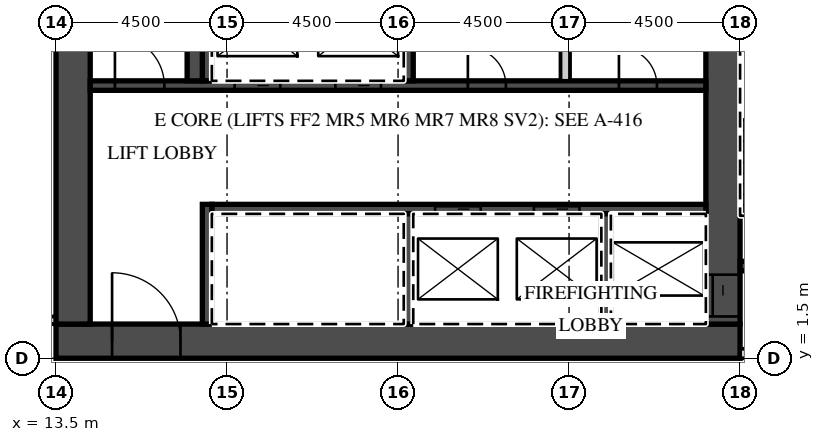
"""IFC4 building model, lengths in metres.
Left out: names, types, materials, properties, quantities, classifications, styles, units other than length and angle.
Written with IfcOpenShell. Run it as: python <this file> out.ifc"""

import sys

from ifc_helpers import new_model, si_unit, direction, frame, frame_2d, origin, place, context, subcontext, project, spatial, rectangle, extrude, element, fill, save


model = new_model("IFC4")
c1 = context("Model", 3, precision=1e-05, world=origin(), true_north=direction((0.0, 1.0)))
c2 = subcontext(c1, "Body", "Model", "MODEL_VIEW")
j1 = project(units=[si_unit("LENGTHUNIT", "METRE"), si_unit("PLANEANGLEUNIT", "RADIAN")], contexts=[c1])
p1 = place(None, origin())
s1 = spatial("IfcSite", under=j1, at=p1, CompositionType="ELEMENT")
p2 = place(p1, origin())
s2 = spatial("IfcBuilding", under=s1, at=p2, CompositionType="ELEMENT")
p3 = place(p2, frame((0.0, 0.0, 221.0)))
s3 = spatial("IfcBuildingStorey", under=s2, at=p3, CompositionType="ELEMENT", Elevation=221.0)
p4 = place(p3, frame((-13.5, 2.5, 0.0), z_axis=(0.0, 0.0, 1.0), x_axis=(1.0, 0.0, 0.0)))
e1 = element("IfcWall", 1, at=p4, inside=s3, PredefinedType="PARTITIONING", context=c2, shape_type="SweptSolid", body=[
    extrude(rectangle(XDim=27.0, YDim=0.2, at=frame_2d((13.5, 0.0))), origin(), (0.0, 0.0, 1.0), 3.02),
])
p5 = place(p4, frame((2.925, 0.0, 0.0)))
e2 = element("IfcOpeningElement", 2, at=p5, cuts=e1, PredefinedType="OPENING", context=c2, shape_type="SweptSolid", body=[
    extrude(rectangle(XDim=1.0, YDim=2.1, at=frame_2d((0.5, 1.05))), frame((0.0, 0.11, 0.0), z_axis=(0.0, -1.0, 0.0), x_axis=(1.0, 0.0, 0.0)), (0.0, 0.0, 1.0), 0.22),
])
p6 = place(p4, frame((7.45, 0.0, 0.0)))
e3 = element("IfcOpeningElement", 3, at=p6, cuts=e1, PredefinedType="OPENING", context=c2, shape_type="SweptSolid", body=[
    extrude(rectangle(XDim=1.0, YDim=2.1, at=frame_2d((0.5, 1.05))), frame((0.0, 0.11, 0.0), z_axis=(0.0, -1.0, 0.0), x_axis=(1.0, 0.0, 0.0)), (0.0, 0.0, 1.0), 0.22),
])
p7 = place(p4, frame((11.925, 0.0, 0.0)))
e4 = element("IfcOpeningElement", 4, at=p7, cuts=e1, PredefinedType="OPENING", context=c2, shape_type="SweptSolid", body=[
    extrude(rectangle(XDim=1.0, YDim=2.1, at=frame_2d((0.5, 1.05))), frame((0.0, 0.11, 0.0), z_axis=(0.0, -1.0, 0.0), x_axis=(1.0, 0.0, 0.0)), (0.0, 0.0, 1.0), 0.22),
])
p8 = place(p4, frame((14.075, 0.0, 0.0)))
e5 = element("IfcOpeningElement", 5, at=p8, cuts=e1, PredefinedType="OPENING", context=c2, shape_type="SweptSolid", body=[
    extrude(rectangle(XDim=1.0, YDim=2.1, at=frame_2d((0.5, 1.05))), frame((0.0, 0.11, 0.0), z_axis=(0.0, -1.0, 0.0), x_axis=(1.0, 0.0, 0.0)), (0.0, 0.0, 1.0), 0.22),
])
p9 = place(p4, frame((20.925, 0.0, 0.0)))
e6 = element("IfcOpeningElement", 6, at=p9, cuts=e1, PredefinedType="OPENING", context=c2, shape_type="SweptSolid", body=[
    extrude(rectangle(XDim=1.0, YDim=2.1, at=frame_2d((0.5, 1.05))), frame((0.0, 0.11, 0.0), z_axis=(0.0, -1.0, 0.0), x_axis=(1.0, 0.0, 0.0)), (0.0, 0.0, 1.0), 0.22),
])
p10 = place(p4, frame((25.425, 0.0, 0.0)))
e7 = element("IfcOpeningElement", 7, at=p10, cuts=e1, PredefinedType="OPENING", context=c2, shape_type="SweptSolid", body=[
    extrude(rectangle(XDim=1.0, YDim=2.1, at=frame_2d((0.5, 1.05))), frame((0.0, 0.11, 0.0), z_axis=(0.0, -1.0, 0.0), x_axis=(1.0, 0.0, 0.0)), (0.0, 0.0, 1.0), 0.22),
])
p11 = place(p3, frame((13.5, 1.95, 0.0), z_axis=(0.0, 0.0, 1.0), x_axis=(1.0, 0.0, 0.0)))
e8 = element("IfcWall", 8, at=p11, inside=s3, PredefinedType="SHEAR", context=c2, shape_type="SweptSolid", body=[
    extrude(rectangle(XDim=18.0, YDim=0.9, at=frame_2d((9.0, 0.0))), origin(), (0.0, 0.0, 1.0), 3.02),
])
p12 = place(p11, frame((1.475, 0.0, 0.0)))
e9 = element("IfcOpeningElement", 9, at=p12, cuts=e8, PredefinedType="OPENING", context=c2, shape_type="SweptSolid", body=[
    extrude(rectangle(XDim=1.8, YDim=2.1, at=frame_2d((0.9, 1.05))), frame((0.0, 0.46, 0.0), z_axis=(0.0, -1.0, 0.0), x_axis=(1.0, 0.0, 0.0)), (0.0, 0.0, 1.0), 0.92),
])
p13 = place(p3, frame((31.05, 2.4, 0.0), z_axis=(0.0, 0.0, 1.0), x_axis=(0.0, 1.0, 0.0)))
e10 = element("IfcWall", 10, at=p13, inside=s3, PredefinedType="SHEAR", context=c2, shape_type="SweptSolid", body=[
    extrude(rectangle(XDim=12.8, YDim=0.9, at=frame_2d((6.4, 0.0))), origin(), (0.0, 0.0, 1.0), 3.02),
])
p14 = place(p13, frame((0.2, 0.0, 0.0)))
e11 = element("IfcOpeningElement", 11, at=p14, cuts=e10, PredefinedType="OPENING", context=c2, shape_type="SweptSolid", body=[
    extrude(rectangle(XDim=1.1, YDim=2.1, at=frame_2d((0.55, 1.05))), frame((0.0, 0.46, 0.0), z_axis=(0.0, -1.0, 0.0), x_axis=(1.0, 0.0, 0.0)), (0.0, 0.0, 1.0), 0.92),
])
p15 = place(p3, frame((13.95, 2.4, 0.0), z_axis=(0.0, 0.0, 1.0), x_axis=(0.0, 1.0, 0.0)))
e12 = element("IfcWall", 12, at=p15, inside=s3, PredefinedType="SHEAR", context=c2, shape_type="SweptSolid", body=[
    extrude(rectangle(XDim=12.2, YDim=0.9, at=frame_2d((6.1, 0.0))), origin(), (0.0, 0.0, 1.0), 3.02),
])
p16 = place(p3, frame((17.6, 5.425, 0.0), z_axis=(0.0, 0.0, 1.0), x_axis=(1.0, 0.0, 0.0)))
e13 = element("IfcWall", 13, at=p16, inside=s3, PredefinedType="SHEAR", context=c2, shape_type="SweptSolid", body=[
    extrude(rectangle(XDim=13.0, YDim=0.25, at=frame_2d((6.5, 0.0))), origin(), (0.0, 0.0, 1.0), 3.02),
])
p17 = place(p16, frame((8.475, 0.0, 0.0)))
e14 = element("IfcOpeningElement", 14, at=p17, cuts=e13, PredefinedType="OPENING", context=c2, shape_type="SweptSolid", body=[
    extrude(rectangle(XDim=1.2, YDim=2.1, at=frame_2d((0.6, 1.05))), frame((0.0, 0.135, 0.0), z_axis=(0.0, -1.0, 0.0), x_axis=(1.0, 0.0, 0.0)), (0.0, 0.0, 1.0), 0.27),
])
p18 = place(p16, frame((5.875, 0.0, 0.0)))
e15 = element("IfcOpeningElement", 15, at=p18, cuts=e13, PredefinedType="OPENING", context=c2, shape_type="SweptSolid", body=[
    extrude(rectangle(XDim=1.2, YDim=2.1, at=frame_2d((0.6, 1.05))), frame((0.0, 0.135, 0.0), z_axis=(0.0, -1.0, 0.0), x_axis=(1.0, 0.0, 0.0)), (0.0, 0.0, 1.0), 0.27),
])
p19 = place(p3, frame((17.475, 2.4, 0.0), z_axis=(0.0, 0.0, 1.0), x_axis=(0.0, 1.0, 0.0)))
e16 = element("IfcWall", 16, at=p19, inside=s3, PredefinedType="SHEAR", context=c2, shape_type="SweptSolid", body=[
    extrude(rectangle(XDim=3.15, YDim=0.25, at=frame_2d((1.575, 0.0))), origin(), (0.0, 0.0, 1.0), 3.02),
])
for number, where, z_axis, x_axis in (
    (17, (27.975, 2.4, 0.0), (0.0, 0.0, 1.0), (0.0, 1.0, 0.0)),
    (18, (22.775, 2.4, 0.0), (0.0, 0.0, 1.0), (0.0, 1.0, 0.0)),
):
    element("IfcWall", number, at=place(p3, frame(where, z_axis=z_axis, x_axis=x_axis)), inside=s3, PredefinedType="SHEAR", context=c2, shape_type="SweptSolid", body=[
        extrude(rectangle(XDim=2.9, YDim=0.25, at=frame_2d((1.45, 0.0))), origin(), (0.0, 0.0, 1.0), 3.02),
    ])
p20 = place(p3, frame((14.4, 8.675, 0.0), z_axis=(0.0, 0.0, 1.0), x_axis=(1.0, 0.0, 0.0)))
e19 = element("IfcWall", 19, at=p20, inside=s3, PredefinedType="SHEAR", context=c2, shape_type="SweptSolid", body=[
    extrude(rectangle(XDim=16.2, YDim=0.25, at=frame_2d((8.1, 0.0))), origin(), (0.0, 0.0, 1.0), 3.02),
])
p21 = place(p20, frame((6.45, 0.0, 0.0)))
e20 = element("IfcOpeningElement", 20, at=p21, cuts=e19, PredefinedType="OPENING", context=c2, shape_type="SweptSolid", body=[
    extrude(rectangle(XDim=1.2, YDim=2.1, at=frame_2d((0.6, 1.05))), frame((0.0, 0.135, 0.0), z_axis=(0.0, -1.0, 0.0), x_axis=(1.0, 0.0, 0.0)), (0.0, 0.0, 1.0), 0.27),
])
p22 = place(p20, frame((3.8, 0.0, 0.0)))
e21 = element("IfcOpeningElement", 21, at=p22, cuts=e19, PredefinedType="OPENING", context=c2, shape_type="SweptSolid", body=[
    extrude(rectangle(XDim=1.2, YDim=2.1, at=frame_2d((0.6, 1.05))), frame((0.0, 0.135, 0.0), z_axis=(0.0, -1.0, 0.0), x_axis=(1.0, 0.0, 0.0)), (0.0, 0.0, 1.0), 0.27),
])
p23 = place(p20, frame((0.65, 0.0, 0.0)))
e22 = element("IfcOpeningElement", 22, at=p23, cuts=e19, PredefinedType="OPENING", context=c2, shape_type="SweptSolid", body=[
    extrude(rectangle(XDim=1.3, YDim=2.1, at=frame_2d((0.65, 1.05))), frame((0.0, 0.135, 0.0), z_axis=(0.0, -1.0, 0.0), x_axis=(1.0, 0.0, 0.0)), (0.0, 0.0, 1.0), 0.27),
])
p24 = place(p20, frame((13.913, 0.0, 0.0)))
e23 = element("IfcOpeningElement", 23, at=p24, cuts=e19, PredefinedType="OPENING", context=c2, shape_type="SweptSolid", body=[
    extrude(rectangle(XDim=1.0, YDim=2.1, at=frame_2d((0.5, 1.05))), frame((0.0, 0.135, 0.0), z_axis=(0.0, -1.0, 0.0), x_axis=(1.0, 0.0, 0.0)), (0.0, 0.0, 1.0), 0.27),
])
p25 = place(p20, frame((9.938, 0.0, 0.0)))
e24 = element("IfcOpeningElement", 24, at=p25, cuts=e19, PredefinedType="OPENING", context=c2, shape_type="SweptSolid", body=[
    extrude(rectangle(XDim=1.0, YDim=2.1, at=frame_2d((0.5, 1.05))), frame((0.0, 0.135, 0.0), z_axis=(0.0, -1.0, 0.0), x_axis=(1.0, 0.0, 0.0)), (0.0, 0.0, 1.0), 0.27),
])
for number, where, z_axis, x_axis in (
    (25, (17.475, 8.8, 0.0), (0.0, 0.0, 1.0), (0.0, 1.0, 0.0)),
    (26, (22.775, 8.8, 0.0), (0.0, 0.0, 1.0), (0.0, 1.0, 0.0)),
):
    element("IfcWall", number, at=place(p3, frame(where, z_axis=z_axis, x_axis=x_axis)), inside=s3, PredefinedType="SHEAR", context=c2, shape_type="SweptSolid", body=[
        extrude(rectangle(XDim=2.9, YDim=0.25, at=frame_2d((1.45, 0.0))), origin(), (0.0, 0.0, 1.0), 3.02),
    ])
p26 = place(p3, frame((26.9, 8.8, 0.0), z_axis=(0.0, 0.0, 1.0), x_axis=(0.0, 1.0, 0.0)))
e27 = element("IfcWall", 27, at=p26, inside=s3, PredefinedType="PARTITIONING", context=c2, shape_type="SweptSolid", body=[
    extrude(rectangle(XDim=2.9, YDim=0.25, at=frame_2d((1.45, 0.0))), origin(), (0.0, 0.0, 1.0), 3.02),
])
p27 = place(p3, frame((17.15, 8.8, 0.0), z_axis=(0.0, 0.0, 1.0), x_axis=(0.0, 1.0, 0.0)))
e28 = element("IfcWall", 28, at=p27, inside=s3, PredefinedType="SHEAR", context=c2, shape_type="SweptSolid", body=[
    extrude(rectangle(XDim=5.8, YDim=0.4, at=frame_2d((2.9, 0.0))), origin(), (0.0, 0.0, 1.0), 3.02),
])
p28 = place(p3, frame((31.5, 1.625, 0.0), z_axis=(0.0, 0.0, 1.0), x_axis=(1.0, 0.0, 0.0)))
e29 = element("IfcWall", 29, at=p28, inside=s3, PredefinedType="PARTITIONING", context=c2, shape_type="SweptSolid", body=[
    extrude(rectangle(XDim=11.04, YDim=0.25, at=frame_2d((5.52, 0.0))), origin(), (0.0, 0.0, 1.0), 3.02),
])
p29 = place(p28, frame((0.625, 0.0, 0.0)))
e30 = element("IfcOpeningElement", 30, at=p29, cuts=e29, PredefinedType="OPENING", context=c2, shape_type="SweptSolid", body=[
    extrude(rectangle(XDim=1.3, YDim=2.1, at=frame_2d((0.65, 1.05))), frame((0.0, 0.135, 0.0), z_axis=(0.0, -1.0, 0.0), x_axis=(1.0, 0.0, 0.0)), (0.0, 0.0, 1.0), 0.27),
])
p30 = place(p28, frame((3.25, 0.0, 0.0)))
e31 = element("IfcOpeningElement", 31, at=p30, cuts=e29, PredefinedType="OPENING", context=c2, shape_type="SweptSolid", body=[
    extrude(rectangle(XDim=1.1, YDim=2.1, at=frame_2d((0.55, 1.05))), frame((0.0, 0.135, 0.0), z_axis=(0.0, -1.0, 0.0), x_axis=(1.0, 0.0, 0.0)), (0.0, 0.0, 1.0), 0.27),
])
p31 = place(p3, frame((31.5, 3.925, 0.0), z_axis=(0.0, 0.0, 1.0), x_axis=(1.0, 0.0, 0.0)))
e32 = element("IfcWall", 32, at=p31, inside=s3, PredefinedType="SHEAR", context=c2, shape_type="SweptSolid", body=[
    extrude(rectangle(XDim=2.55, YDim=0.25, at=frame_2d((1.275, 0.0))), origin(), (0.0, 0.0, 1.0), 3.02),
])
p32 = place(p31, frame((0.625, 0.0, 0.0)))
e33 = element("IfcOpeningElement", 33, at=p32, cuts=e32, PredefinedType="OPENING", context=c2, shape_type="SweptSolid", body=[
    extrude(rectangle(XDim=1.3, YDim=2.1, at=frame_2d((0.65, 1.05))), frame((0.0, 0.135, 0.0), z_axis=(0.0, -1.0, 0.0), x_axis=(1.0, 0.0, 0.0)), (0.0, 0.0, 1.0), 0.27),
])
p33 = place(p21, origin())
e34 = element("IfcDoor", 34, at=p33, inside=s3, OperationType="SLIDING_TO_LEFT", PredefinedType="DOOR", context=c2, shape_type="SweptSolid", body=[
    extrude(rectangle(XDim=1.2, YDim=2.1, at=frame_2d((0.6, 1.05))), frame((0.0, 0.025, 0.0), z_axis=(0.0, -1.0, 0.0), x_axis=(1.0, 0.0, 0.0)), (0.0, 0.0, 1.0), 0.05),
])
fill(e20, e34)
p34 = place(p22, origin())
e35 = element("IfcDoor", 35, at=p34, inside=s3, OperationType="SLIDING_TO_RIGHT", PredefinedType="DOOR", context=c2, shape_type="SweptSolid", body=[
    extrude(rectangle(XDim=1.2, YDim=2.1, at=frame_2d((0.6, 1.05))), frame((0.0, 0.025, 0.0), z_axis=(0.0, -1.0, 0.0), x_axis=(1.0, 0.0, 0.0)), (0.0, 0.0, 1.0), 0.05),
])
fill(e21, e35)
p35 = place(p17, origin())
e36 = element("IfcDoor", 36, at=p35, inside=s3, OperationType="SLIDING_TO_LEFT", PredefinedType="DOOR", context=c2, shape_type="SweptSolid", body=[
    extrude(rectangle(XDim=1.2, YDim=2.1, at=frame_2d((0.6, 1.05))), frame((0.0, 0.025, 0.0), z_axis=(0.0, -1.0, 0.0), x_axis=(1.0, 0.0, 0.0)), (0.0, 0.0, 1.0), 0.05),
])
fill(e14, e36)
p36 = place(p18, origin())
e37 = element("IfcDoor", 37, at=p36, inside=s3, OperationType="SLIDING_TO_RIGHT", PredefinedType="DOOR", context=c2, shape_type="SweptSolid", body=[
    extrude(rectangle(XDim=1.2, YDim=2.1, at=frame_2d((0.6, 1.05))), frame((0.0, 0.025, 0.0), z_axis=(0.0, -1.0, 0.0), x_axis=(1.0, 0.0, 0.0)), (0.0, 0.0, 1.0), 0.05),
])
fill(e15, e37)
p37 = place(p14, origin())
e38 = element("IfcDoor", 38, at=p37, inside=s3, OperationType="SLIDING_TO_LEFT", PredefinedType="DOOR", context=c2, shape_type="SweptSolid", body=[
    extrude(rectangle(XDim=1.1, YDim=2.1, at=frame_2d((0.55, 1.05))), frame((0.0, 0.025, 0.0), z_axis=(0.0, -1.0, 0.0), x_axis=(1.0, 0.0, 0.0)), (0.0, 0.0, 1.0), 0.05),
])
fill(e11, e38)
p38 = place(p12, origin())
e39 = element("IfcDoor", 39, at=p38, inside=s3, OperationType="DOUBLE_DOOR_DOUBLE_SWING", PredefinedType="DOOR", context=c2, shape_type="SweptSolid", body=[
    extrude(rectangle(XDim=1.8, YDim=2.1, at=frame_2d((0.9, 1.05))), frame((0.0, 0.025, 0.0), z_axis=(0.0, -1.0, 0.0), x_axis=(1.0, 0.0, 0.0)), (0.0, 0.0, 1.0), 0.05),
])
fill(e9, e39)
p39 = place(p23, origin())
e40 = element("IfcDoor", 40, at=p39, inside=s3, OperationType="SINGLE_SWING_LEFT", PredefinedType="DOOR", context=c2, shape_type="SweptSolid", body=[
    extrude(rectangle(XDim=1.3, YDim=2.1, at=frame_2d((0.65, 1.05))), frame((0.0, 0.025, 0.0), z_axis=(0.0, -1.0, 0.0), x_axis=(1.0, 0.0, 0.0)), (0.0, 0.0, 1.0), 0.05),
])
fill(e22, e40)
p40 = place(p24, origin())
e41 = element("IfcDoor", 41, at=p40, inside=s3, OperationType="SINGLE_SWING_LEFT", PredefinedType="DOOR", context=c2, shape_type="SweptSolid", body=[
    extrude(rectangle(XDim=1.0, YDim=2.1, at=frame_2d((0.5, 1.05))), frame((0.0, 0.025, 0.0), z_axis=(0.0, -1.0, 0.0), x_axis=(1.0, 0.0, 0.0)), (0.0, 0.0, 1.0), 0.05),
])
fill(e23, e41)
p41 = place(p25, origin())
e42 = element("IfcDoor", 42, at=p41, inside=s3, OperationType="SINGLE_SWING_LEFT", PredefinedType="DOOR", context=c2, shape_type="SweptSolid", body=[
    extrude(rectangle(XDim=1.0, YDim=2.1, at=frame_2d((0.5, 1.05))), frame((0.0, 0.025, 0.0), z_axis=(0.0, -1.0, 0.0), x_axis=(1.0, 0.0, 0.0)), (0.0, 0.0, 1.0), 0.05),
])
fill(e24, e42)
save(model, sys.argv[1])
